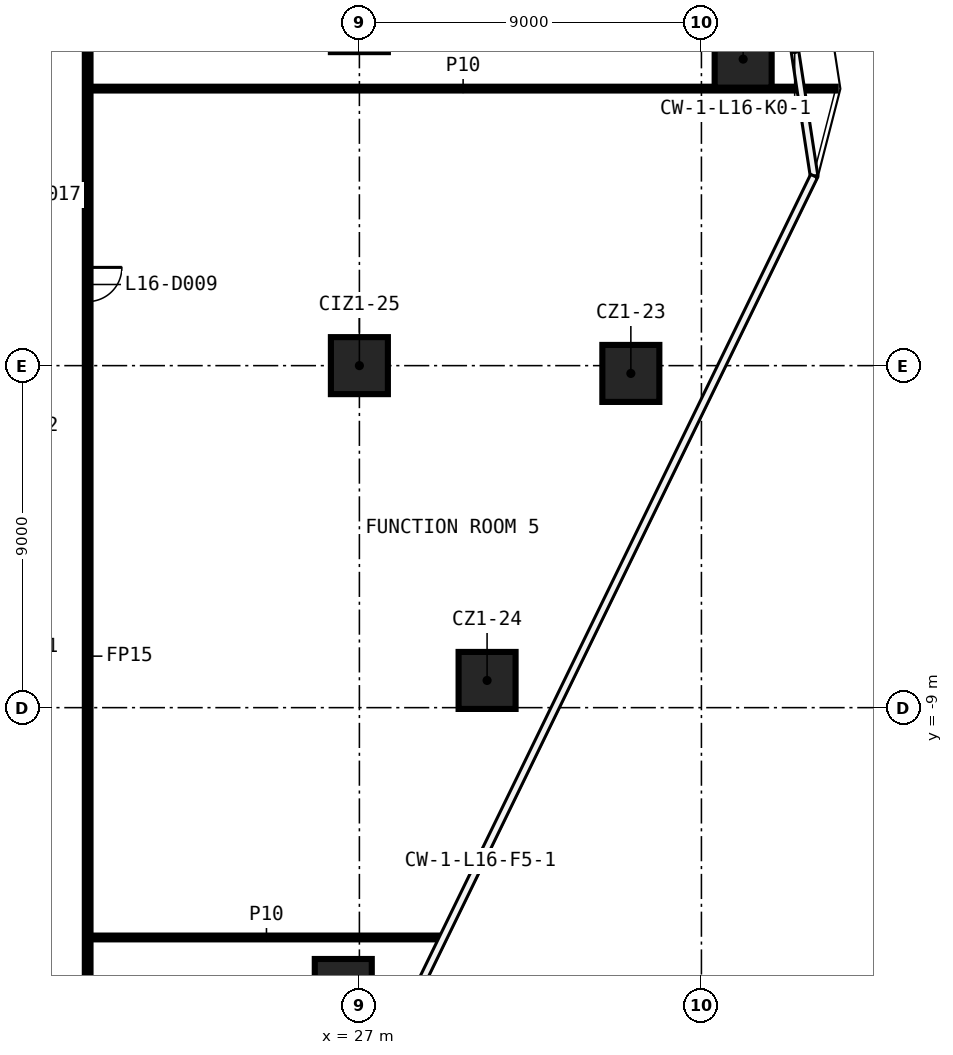
"""IFC4 building model, lengths in metres.
Left out: names, types, materials, properties, quantities, classifications, styles, units other than length and angle.
Written with IfcOpenShell. Run it as: python <this file> out.ifc"""

import sys

from ifc_helpers import new_model, si_unit, direction, frame, frame_2d, origin, origin_2d, place, context, subcontext, project, spatial, rectangle, extrude, element, fill, save


model = new_model("IFC4")
c1 = context("Model", 3, precision=1e-05, world=origin(), true_north=direction((0.0, 1.0)))
c2 = subcontext(c1, "Body", "Model", "MODEL_VIEW")
j1 = project(units=[si_unit("LENGTHUNIT", "METRE"), si_unit("PLANEANGLEUNIT", "RADIAN")], contexts=[c1])
p1 = place(None, origin())
s1 = spatial("IfcSite", under=j1, at=p1, CompositionType="ELEMENT")
p2 = place(p1, origin())
s2 = spatial("IfcBuilding", under=s1, at=p2, CompositionType="ELEMENT")
p3 = place(p2, frame((0.0, 0.0, 81.0)))
s3 = spatial("IfcBuildingStorey", under=s2, at=p3, CompositionType="ELEMENT", Elevation=81.0)
for number, where, z_axis, x_axis in (
    (1, (37.098, 8.066, 0.0), (0.0, 0.0, 1.0), (1.0, 0.0, 0.0)),
    (2, (34.143, -0.205, 0.0), (0.0, 0.0, 1.0), (1.0, 0.0, 0.0)),
    (3, (30.36, -8.284, 0.0), (0.0, 0.0, 1.0), (1.0, 0.0, 0.0)),
    (4, (26.576, -16.364, 0.0), (0.0, 0.0, 1.0), (1.0, 0.0, 0.0)),
    (5, (27.0, 0.0, 0.0), (0.0, 0.0, 1.0), (1.0, 0.0, 0.0)),
):
    element("IfcColumn", number, at=place(p3, frame(where, z_axis=z_axis, x_axis=x_axis)), inside=s3, PredefinedType="COLUMN", context=c2, shape_type="SweptSolid", body=[
        extrude(rectangle(XDim=1.5, YDim=1.5, at=origin_2d()), origin(), (0.0, 0.0, 1.0), 3.3),
    ])
p4 = place(p3, frame((19.925, -15.048, 0.0), z_axis=(0.0, 0.0, 1.0), x_axis=(1.0, 0.0, 0.0)))
e6 = element("IfcWall", 6, at=p4, inside=s3, PredefinedType="PARTITIONING", context=c2, shape_type="SweptSolid", body=[
    extrude(rectangle(XDim=9.26, YDim=0.1, at=frame_2d((4.63, 0.0))), origin(), (0.0, 0.0, 1.0), 3.3),
])
p5 = place(p3, frame((19.925, 7.29, 0.0), z_axis=(0.0, 0.0, 1.0), x_axis=(1.0, 0.0, 0.0)))
e7 = element("IfcWall", 7, at=p5, inside=s3, PredefinedType="PARTITIONING", context=c2, shape_type="SweptSolid", body=[
    extrude(rectangle(XDim=19.609, YDim=0.1, at=frame_2d((9.804, 0.0))), origin(), (0.0, 0.0, 1.0), 3.3),
])
p6 = place(p3, frame((19.85, 16.775, 0.0), z_axis=(0.0, 0.0, 1.0), x_axis=(0.0, -1.0, 0.0)))
e8 = element("IfcWall", 8, at=p6, inside=s3, PredefinedType="PARTITIONING", context=c2, shape_type="SweptSolid", body=[
    extrude(rectangle(XDim=33.55, YDim=0.15, at=frame_2d((16.775, 0.0))), origin(), (0.0, 0.0, 1.0), 3.3),
])
p7 = place(p6, frame((14.19, 0.0, 0.0)))
e9 = element("IfcOpeningElement", 9, at=p7, cuts=e8, PredefinedType="OPENING", context=c2, shape_type="SweptSolid", body=[
    extrude(rectangle(XDim=0.9, YDim=2.1, at=frame_2d((0.45, 1.05))), frame((0.0, 0.085, 0.0), z_axis=(0.0, -1.0, 0.0), x_axis=(1.0, 0.0, 0.0)), (0.0, 0.0, 1.0), 0.17),
])
p8 = place(p7, origin())
e10 = element("IfcDoor", 10, at=p8, inside=s3, OperationType="SINGLE_SWING_RIGHT", PredefinedType="DOOR", context=c2, shape_type="SweptSolid", body=[
    extrude(rectangle(XDim=0.9, YDim=2.1, at=frame_2d((0.45, 1.05))), frame((0.0, 0.025, 0.0), z_axis=(0.0, -1.0, 0.0), x_axis=(1.0, 0.0, 0.0)), (0.0, 0.0, 1.0), 0.05),
])
fill(e9, e10)
save(model, sys.argv[1])
